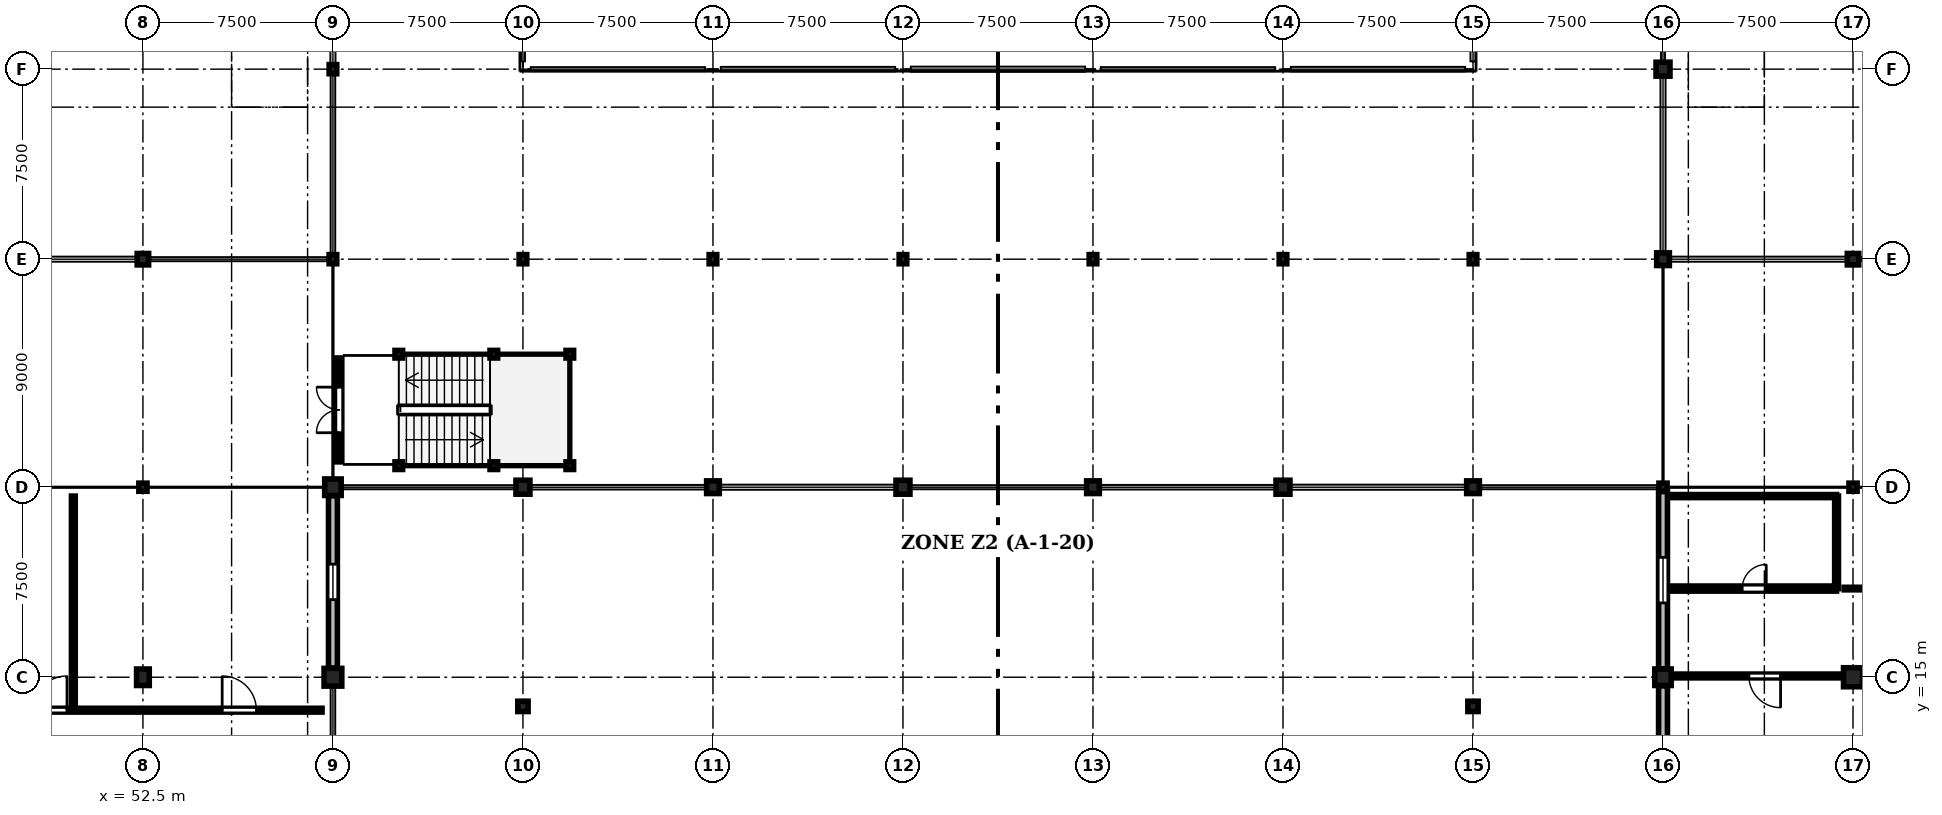
"""IFC4 building model, lengths in metres.
Left out: names, types, materials, properties, quantities, classifications, styles, units other than length and angle.
Written with IfcOpenShell. Run it as: python <this file> out.ifc"""

import sys

from ifc_helpers import new_model, si_unit, direction, frame, frame_2d, origin, origin_2d, place, context, subcontext, project, spatial, rectangle, hollow_circle, i_section, extrude, element, fill, save


model = new_model("IFC4")
c1 = context("Model", 3, precision=1e-05, world=origin(), true_north=direction((0.0, 1.0)))
c2 = subcontext(c1, "Body", "Model", "MODEL_VIEW")
j1 = project(units=[si_unit("LENGTHUNIT", "METRE"), si_unit("PLANEANGLEUNIT", "RADIAN")], contexts=[c1])
p1 = place(None, origin())
s1 = spatial("IfcSite", under=j1, at=p1, CompositionType="ELEMENT")
p2 = place(p1, origin())
s2 = spatial("IfcBuilding", under=s1, at=p2, CompositionType="ELEMENT")
p3 = place(p2, frame((0.0, 0.0, 4.8)))
s3 = spatial("IfcBuildingStorey", under=s2, at=p3, CompositionType="ELEMENT", Elevation=4.8)
p4 = place(p3, frame((52.5, 15.0, 0.0), z_axis=(0.0, 0.0, 1.0), x_axis=(1.0, 0.0, 0.0)))
e1 = element("IfcColumn", 1, at=p4, inside=s3, PredefinedType="COLUMN", context=c2, shape_type="SweptSolid", body=[
    extrude(rectangle(XDim=0.5, YDim=0.65, at=origin_2d()), origin(), (0.0, 0.0, 1.0), 4.5),
])
p5 = place(p3, frame((52.5, 22.5, 0.0), z_axis=(0.0, 0.0, 1.0), x_axis=(1.0, 0.0, 0.0)))
e2 = element("IfcColumn", 2, at=p5, inside=s3, PredefinedType="COLUMN", context=c2, shape_type="SweptSolid", body=[
    extrude(rectangle(XDim=0.32, YDim=0.32, at=origin_2d()), origin(), (0.0, 0.0, 1.0), 4.5),
])
p6 = place(p3, frame((52.5, 31.5, 0.0), z_axis=(0.0, 0.0, 1.0), x_axis=(1.0, 0.0, 0.0)))
e3 = element("IfcColumn", 3, at=p6, inside=s3, PredefinedType="COLUMN", context=c2, shape_type="SweptSolid", body=[
    extrude(rectangle(XDim=0.45, YDim=0.45, at=origin_2d()), origin(), (0.0, 0.0, 1.0), 4.5),
])
p7 = place(p3, frame((60.0, 15.0, 0.0), z_axis=(0.0, 0.0, 1.0), x_axis=(1.0, 0.0, 0.0)))
e4 = element("IfcColumn", 4, at=p7, inside=s3, PredefinedType="COLUMN", context=c2, shape_type="SweptSolid", body=[
    extrude(rectangle(XDim=0.7, YDim=0.7, at=origin_2d()), origin(), (0.0, 0.0, 1.0), 4.5),
])
p8 = place(p3, frame((60.0, 22.5, 0.0), z_axis=(0.0, 0.0, 1.0), x_axis=(1.0, 0.0, 0.0)))
e5 = element("IfcColumn", 5, at=p8, inside=s3, PredefinedType="COLUMN", context=c2, shape_type="SweptSolid", body=[
    extrude(rectangle(XDim=0.65, YDim=0.65, at=origin_2d()), origin(), (0.0, 0.0, 1.0), 4.5),
])
for number, where, z_axis, x_axis in (
    (6, (60.0, 31.5, 0.0), (0.0, 0.0, 1.0), (1.0, 0.0, 0.0)),
    (7, (60.0, 39.0, 0.0), (0.0, 0.0, 1.0), (1.0, 0.0, 0.0)),
):
    element("IfcColumn", number, at=place(p3, frame(where, z_axis=z_axis, x_axis=x_axis)), inside=s3, PredefinedType="COLUMN", context=c2, shape_type="SweptSolid", body=[
        extrude(i_section(OverallWidth=0.3, OverallDepth=0.36, WebThickness=0.012, FlangeThickness=0.022, FilletRadius=0.027, at=origin_2d()), origin(), (0.0, 0.0, 1.0), 4.5),
    ])
p9 = place(p3, frame((67.5, 22.5, 0.0), z_axis=(0.0, 0.0, 1.0), x_axis=(1.0, 0.0, 0.0)))
e8 = element("IfcColumn", 8, at=p9, inside=s3, PredefinedType="COLUMN", context=c2, shape_type="SweptSolid", body=[
    extrude(rectangle(XDim=0.55, YDim=0.55, at=origin_2d()), origin(), (0.0, 0.0, 1.0), 4.5),
])
p10 = place(p3, frame((67.5, 31.5, 0.0), z_axis=(0.0, 0.0, 1.0), x_axis=(1.0, 0.0, 0.0)))
e9 = element("IfcColumn", 9, at=p10, inside=s3, PredefinedType="COLUMN", context=c2, shape_type="SweptSolid", body=[
    extrude(i_section(OverallWidth=0.3, OverallDepth=0.36, WebThickness=0.012, FlangeThickness=0.022, FilletRadius=0.027, at=origin_2d()), origin(), (0.0, 0.0, 1.0), 4.5),
])
p11 = place(p3, frame((75.0, 22.5, 0.0), z_axis=(0.0, 0.0, 1.0), x_axis=(1.0, 0.0, 0.0)))
e10 = element("IfcColumn", 10, at=p11, inside=s3, PredefinedType="COLUMN", context=c2, shape_type="SweptSolid", body=[
    extrude(rectangle(XDim=0.5, YDim=0.5, at=origin_2d()), origin(), (0.0, 0.0, 1.0), 4.5),
])
p12 = place(p3, frame((75.0, 31.5, 0.0), z_axis=(0.0, 0.0, 1.0), x_axis=(1.0, 0.0, 0.0)))
e11 = element("IfcColumn", 11, at=p12, inside=s3, PredefinedType="COLUMN", context=c2, shape_type="SweptSolid", body=[
    extrude(i_section(OverallWidth=0.3, OverallDepth=0.36, WebThickness=0.012, FlangeThickness=0.022, FilletRadius=0.027, at=origin_2d()), origin(), (0.0, 0.0, 1.0), 4.5),
])
p13 = place(p3, frame((82.5, 22.5, 0.0), z_axis=(0.0, 0.0, 1.0), x_axis=(1.0, 0.0, 0.0)))
e12 = element("IfcColumn", 12, at=p13, inside=s3, PredefinedType="COLUMN", context=c2, shape_type="SweptSolid", body=[
    extrude(rectangle(XDim=0.55, YDim=0.55, at=origin_2d()), origin(), (0.0, 0.0, 1.0), 4.5),
])
p14 = place(p3, frame((82.5, 31.5, 0.0), z_axis=(0.0, 0.0, 1.0), x_axis=(1.0, 0.0, 0.0)))
e13 = element("IfcColumn", 13, at=p14, inside=s3, PredefinedType="COLUMN", context=c2, shape_type="SweptSolid", body=[
    extrude(i_section(OverallWidth=0.3, OverallDepth=0.36, WebThickness=0.012, FlangeThickness=0.022, FilletRadius=0.027, at=origin_2d()), origin(), (0.0, 0.0, 1.0), 4.5),
])
p15 = place(p3, frame((90.0, 22.5, 0.0), z_axis=(0.0, 0.0, 1.0), x_axis=(1.0, 0.0, 0.0)))
e14 = element("IfcColumn", 14, at=p15, inside=s3, PredefinedType="COLUMN", context=c2, shape_type="SweptSolid", body=[
    extrude(rectangle(XDim=0.5, YDim=0.5, at=origin_2d()), origin(), (0.0, 0.0, 1.0), 4.5),
])
p16 = place(p3, frame((90.0, 31.5, 0.0), z_axis=(0.0, 0.0, 1.0), x_axis=(1.0, 0.0, 0.0)))
e15 = element("IfcColumn", 15, at=p16, inside=s3, PredefinedType="COLUMN", context=c2, shape_type="SweptSolid", body=[
    extrude(i_section(OverallWidth=0.3, OverallDepth=0.36, WebThickness=0.012, FlangeThickness=0.022, FilletRadius=0.027, at=origin_2d()), origin(), (0.0, 0.0, 1.0), 4.5),
])
p17 = place(p3, frame((97.5, 22.5, 0.0), z_axis=(0.0, 0.0, 1.0), x_axis=(1.0, 0.0, 0.0)))
e16 = element("IfcColumn", 16, at=p17, inside=s3, PredefinedType="COLUMN", context=c2, shape_type="SweptSolid", body=[
    extrude(rectangle(XDim=0.55, YDim=0.55, at=origin_2d()), origin(), (0.0, 0.0, 1.0), 4.5),
])
p18 = place(p3, frame((97.5, 31.5, 0.0), z_axis=(0.0, 0.0, 1.0), x_axis=(1.0, 0.0, 0.0)))
e17 = element("IfcColumn", 17, at=p18, inside=s3, PredefinedType="COLUMN", context=c2, shape_type="SweptSolid", body=[
    extrude(i_section(OverallWidth=0.3, OverallDepth=0.36, WebThickness=0.012, FlangeThickness=0.022, FilletRadius=0.027, at=origin_2d()), origin(), (0.0, 0.0, 1.0), 4.5),
])
p19 = place(p3, frame((105.0, 22.5, 0.0), z_axis=(0.0, 0.0, 1.0), x_axis=(1.0, 0.0, 0.0)))
e18 = element("IfcColumn", 18, at=p19, inside=s3, PredefinedType="COLUMN", context=c2, shape_type="SweptSolid", body=[
    extrude(rectangle(XDim=0.5, YDim=0.5, at=origin_2d()), origin(), (0.0, 0.0, 1.0), 4.5),
])
p20 = place(p3, frame((105.0, 31.5, 0.0), z_axis=(0.0, 0.0, 1.0), x_axis=(1.0, 0.0, 0.0)))
e19 = element("IfcColumn", 19, at=p20, inside=s3, PredefinedType="COLUMN", context=c2, shape_type="SweptSolid", body=[
    extrude(i_section(OverallWidth=0.3, OverallDepth=0.36, WebThickness=0.012, FlangeThickness=0.022, FilletRadius=0.027, at=origin_2d()), origin(), (0.0, 0.0, 1.0), 4.5),
])
p21 = place(p3, frame((112.5, 15.0, 0.0), z_axis=(0.0, 0.0, 1.0), x_axis=(1.0, 0.0, 0.0)))
e20 = element("IfcColumn", 20, at=p21, inside=s3, PredefinedType="COLUMN", context=c2, shape_type="SweptSolid", body=[
    extrude(rectangle(XDim=0.65, YDim=0.65, at=origin_2d()), origin(), (0.0, 0.0, 1.0), 4.5),
])
p22 = place(p3, frame((112.5, 22.5, 0.0), z_axis=(0.0, 0.0, 1.0), x_axis=(1.0, 0.0, 0.0)))
e21 = element("IfcColumn", 21, at=p22, inside=s3, PredefinedType="COLUMN", context=c2, shape_type="SweptSolid", body=[
    extrude(rectangle(XDim=0.32, YDim=0.32, at=origin_2d()), origin(), (0.0, 0.0, 1.0), 4.5),
])
p23 = place(p3, frame((112.5, 31.5, 0.0), z_axis=(0.0, 0.0, 1.0), x_axis=(1.0, 0.0, 0.0)))
e22 = element("IfcColumn", 22, at=p23, inside=s3, PredefinedType="COLUMN", context=c2, shape_type="SweptSolid", body=[
    extrude(rectangle(XDim=0.5, YDim=0.5, at=origin_2d()), origin(), (0.0, 0.0, 1.0), 4.5),
])
p24 = place(p3, frame((112.5, 39.0, 0.0), z_axis=(0.0, 0.0, 1.0), x_axis=(1.0, 0.0, 0.0)))
e23 = element("IfcColumn", 23, at=p24, inside=s3, PredefinedType="COLUMN", context=c2, shape_type="SweptSolid", body=[
    extrude(rectangle(XDim=0.55, YDim=0.55, at=origin_2d()), origin(), (0.0, 0.0, 1.0), 4.5),
])
p25 = place(p3, frame((120.0, 15.0, 0.0), z_axis=(0.0, 0.0, 1.0), x_axis=(1.0, 0.0, 0.0)))
e24 = element("IfcColumn", 24, at=p25, inside=s3, PredefinedType="COLUMN", context=c2, shape_type="SweptSolid", body=[
    extrude(rectangle(XDim=0.75, YDim=0.75, at=origin_2d()), origin(), (0.0, 0.0, 1.0), 4.5),
])
p26 = place(p3, frame((120.0, 22.5, 0.0), z_axis=(0.0, 0.0, 1.0), x_axis=(1.0, 0.0, 0.0)))
e25 = element("IfcColumn", 25, at=p26, inside=s3, PredefinedType="COLUMN", context=c2, shape_type="SweptSolid", body=[
    extrude(rectangle(XDim=0.32, YDim=0.32, at=origin_2d()), origin(), (0.0, 0.0, 1.0), 4.5),
])
p27 = place(p3, frame((120.0, 31.5, 0.0), z_axis=(0.0, 0.0, 1.0), x_axis=(1.0, 0.0, 0.0)))
e26 = element("IfcColumn", 26, at=p27, inside=s3, PredefinedType="COLUMN", context=c2, shape_type="SweptSolid", body=[
    extrude(rectangle(XDim=0.45, YDim=0.45, at=origin_2d()), origin(), (0.0, 0.0, 1.0), 4.5),
])
for number, where, z_axis, x_axis in (
    (27, (62.6, 23.35, 0.0), (0.0, 0.0, 1.0), (1.0, 0.0, 0.0)),
    (28, (66.35, 23.35, 0.0), (0.0, 0.0, 1.0), (1.0, 0.0, 0.0)),
    (29, (69.35, 23.35, 0.0), (0.0, 0.0, 1.0), (1.0, 0.0, 0.0)),
    (30, (62.6, 27.75, 0.0), (0.0, 0.0, 1.0), (1.0, 0.0, 0.0)),
    (31, (66.35, 27.75, 0.0), (0.0, 0.0, 1.0), (1.0, 0.0, 0.0)),
    (32, (69.35, 27.75, 0.0), (0.0, 0.0, 1.0), (1.0, 0.0, 0.0)),
):
    element("IfcColumn", number, at=place(p3, frame(where, z_axis=z_axis, x_axis=x_axis)), inside=s3, PredefinedType="COLUMN", context=c2, shape_type="SweptSolid", body=[
        extrude(i_section(OverallWidth=0.3, OverallDepth=0.3, WebThickness=0.011, FlangeThickness=0.019, FilletRadius=0.027, at=origin_2d()), origin(), (0.0, 0.0, 1.0), 4.5),
    ])
for number, where, z_axis, x_axis in (
    (33, (67.5, 13.85, 0.0), (0.0, 0.0, 1.0), (1.0, 0.0, 0.0)),
    (34, (105.0, 13.85, 0.0), (0.0, 0.0, 1.0), (1.0, 0.0, 0.0)),
):
    element("IfcColumn", number, at=place(p3, frame(where, z_axis=z_axis, x_axis=x_axis)), inside=s3, PredefinedType="COLUMN", context=c2, shape_type="SweptSolid", body=[
        extrude(hollow_circle(Radius=0.203, WallThickness=0.016, at=origin_2d()), origin(), (0.0, 0.0, 1.0), 3.58),
    ])
p28 = place(p3, frame((60.0, 22.165, 0.0), z_axis=(0.0, 0.0, 1.0), x_axis=(0.0, -1.0, 0.0)))
e35 = element("IfcWall", 35, at=p28, inside=s3, PredefinedType="STANDARD", context=c2, shape_type="SweptSolid", body=[
    extrude(rectangle(XDim=6.805, YDim=0.35, at=frame_2d((3.402, 0.0))), origin(), (0.0, 0.0, 1.0), 3.63),
])
p29 = place(p28, frame((2.702, 0.0, 0.9)))
e36 = element("IfcOpeningElement", 36, at=p29, cuts=e35, PredefinedType="OPENING", context=c2, shape_type="SweptSolid", body=[
    extrude(rectangle(XDim=1.4, YDim=1.8, at=frame_2d((0.7, 0.9))), frame((0.0, 0.185, 0.0), z_axis=(0.0, -1.0, 0.0), x_axis=(1.0, 0.0, 0.0)), (0.0, 0.0, 1.0), 0.37),
])
p30 = place(p3, frame((112.5, 7.86, 0.0), z_axis=(0.0, 0.0, 1.0), x_axis=(0.0, 1.0, 0.0)))
e37 = element("IfcWall", 37, at=p30, inside=s3, PredefinedType="STANDARD", context=c2, shape_type="SweptSolid", body=[
    extrude(rectangle(XDim=6.805, YDim=0.35, at=frame_2d((3.402, 0.0))), origin(), (0.0, 0.0, 1.0), 3.63),
])
p31 = place(p30, frame((2.202, 0.0, 0.9)))
e38 = element("IfcOpeningElement", 38, at=p31, cuts=e37, PredefinedType="OPENING", context=c2, shape_type="SweptSolid", body=[
    extrude(rectangle(XDim=2.4, YDim=2.45, at=frame_2d((1.2, 1.225))), frame((0.0, 0.185, 0.0), z_axis=(0.0, -1.0, 0.0), x_axis=(1.0, 0.0, 0.0)), (0.0, 0.0, 1.0), 0.37),
])
p32 = place(p3, frame((112.5, 15.335, 0.0), z_axis=(0.0, 0.0, 1.0), x_axis=(0.0, 1.0, 0.0)))
e39 = element("IfcWall", 39, at=p32, inside=s3, PredefinedType="STANDARD", context=c2, shape_type="SweptSolid", body=[
    extrude(rectangle(XDim=6.995, YDim=0.35, at=frame_2d((3.498, 0.0))), origin(), (0.0, 0.0, 1.0), 3.63),
])
p33 = place(p32, frame((2.597, 0.0, 0.9)))
e40 = element("IfcOpeningElement", 40, at=p33, cuts=e39, PredefinedType="OPENING", context=c2, shape_type="SweptSolid", body=[
    extrude(rectangle(XDim=1.8, YDim=2.1, at=frame_2d((0.9, 1.05))), frame((0.0, 0.185, 0.0), z_axis=(0.0, -1.0, 0.0), x_axis=(1.0, 0.0, 0.0)), (0.0, 0.0, 1.0), 0.37),
])
p34 = place(p3, frame((60.25, 23.5, 0.0), z_axis=(0.0, 0.0, 1.0), x_axis=(0.0, 1.0, 0.0)))
e41 = element("IfcWall", 41, at=p34, inside=s3, PredefinedType="STANDARD", context=c2, shape_type="SweptSolid", body=[
    extrude(rectangle(XDim=4.1, YDim=0.2, at=frame_2d((2.05, 0.0))), origin(), (0.0, 0.0, 1.0), 3.465),
])
p35 = place(p34, frame((1.15, 0.0, 0.0)))
e42 = element("IfcOpeningElement", 42, at=p35, cuts=e41, PredefinedType="OPENING", context=c2, shape_type="SweptSolid", body=[
    extrude(rectangle(XDim=1.8, YDim=2.25, at=frame_2d((0.9, 1.125))), frame((0.0, 0.11, 0.0), z_axis=(0.0, -1.0, 0.0), x_axis=(1.0, 0.0, 0.0)), (0.0, 0.0, 1.0), 0.22),
])
p36 = place(p3, frame((40.097, 13.7, 0.0), z_axis=(0.0, 0.0, 1.0), x_axis=(1.0, 0.0, 0.0)))
e43 = element("IfcWall", 43, at=p36, inside=s3, PredefinedType="PARTITIONING", context=c2, shape_type="SweptSolid", body=[
    extrude(rectangle(XDim=9.657, YDim=0.15, at=frame_2d((4.828, 0.0))), origin(), (0.0, 0.0, 1.0), 4.165),
])
p37 = place(p36, frame((8.057, 0.0, 0.0)))
e44 = element("IfcOpeningElement", 44, at=p37, cuts=e43, PredefinedType="OPENING", context=c2, shape_type="SweptSolid", body=[
    extrude(rectangle(XDim=1.35, YDim=2.25, at=frame_2d((0.675, 1.125))), frame((0.0, 0.085, 0.0), z_axis=(0.0, -1.0, 0.0), x_axis=(1.0, 0.0, 0.0)), (0.0, 0.0, 1.0), 0.17),
])
p38 = place(p3, frame((49.913, 13.7, 0.0), z_axis=(0.0, 0.0, 1.0), x_axis=(1.0, 0.0, 0.0)))
e45 = element("IfcWall", 45, at=p38, inside=s3, PredefinedType="PARTITIONING", context=c2, shape_type="SweptSolid", body=[
    extrude(rectangle(XDim=9.657, YDim=0.15, at=frame_2d((4.828, 0.0))), origin(), (0.0, 0.0, 1.0), 4.165),
])
p39 = place(p38, frame((5.715, 0.0, 0.0)))
e46 = element("IfcOpeningElement", 46, at=p39, cuts=e45, PredefinedType="OPENING", context=c2, shape_type="SweptSolid", body=[
    extrude(rectangle(XDim=1.35, YDim=2.25, at=frame_2d((0.675, 1.125))), frame((0.0, 0.085, 0.0), z_axis=(0.0, -1.0, 0.0), x_axis=(1.0, 0.0, 0.0)), (0.0, 0.0, 1.0), 0.17),
])
p40 = place(p3, frame((123.9, 15.05, 0.0), z_axis=(0.0, 0.0, 1.0), x_axis=(-1.0, 0.0, 0.0)))
e47 = element("IfcWall", 47, at=p40, inside=s3, PredefinedType="PARTITIONING", context=c2, shape_type="SweptSolid", body=[
    extrude(rectangle(XDim=11.05, YDim=0.15, at=frame_2d((5.525, 0.0))), origin(), (0.0, 0.0, 1.0), 3.515),
])
p41 = place(p40, frame((6.76, 0.0, 0.0)))
e48 = element("IfcOpeningElement", 48, at=p41, cuts=e47, PredefinedType="OPENING", context=c2, shape_type="SweptSolid", body=[
    extrude(rectangle(XDim=1.25, YDim=2.2, at=frame_2d((0.625, 1.1))), frame((0.0, 0.085, 0.0), z_axis=(0.0, -1.0, 0.0), x_axis=(1.0, 0.0, 0.0)), (0.0, 0.0, 1.0), 0.17),
])
p42 = place(p3, frame((112.85, 18.5, 0.0), z_axis=(0.0, 0.0, 1.0), x_axis=(1.0, 0.0, 0.0)))
e49 = element("IfcWall", 49, at=p42, inside=s3, PredefinedType="STANDARD", context=c2, shape_type="SweptSolid", body=[
    extrude(rectangle(XDim=6.5, YDim=0.2, at=frame_2d((3.25, 0.0))), origin(), (0.0, 0.0, 1.0), 4.165),
])
p43 = place(p42, frame((2.775, 0.0, 0.0)))
e50 = element("IfcOpeningElement", 50, at=p43, cuts=e49, PredefinedType="OPENING", context=c2, shape_type="SweptSolid", body=[
    extrude(rectangle(XDim=0.95, YDim=2.15, at=frame_2d((0.475, 1.075))), frame((0.0, 0.11, 0.0), z_axis=(0.0, -1.0, 0.0), x_axis=(1.0, 0.0, 0.0)), (0.0, 0.0, 1.0), 0.22),
])
p44 = place(p3, frame((119.65, 18.5, 0.0), z_axis=(0.0, 0.0, 1.0), x_axis=(1.0, 0.0, 0.0)))
e51 = element("IfcWall", 51, at=p44, inside=s3, PredefinedType="PARTITIONING", context=c2, shape_type="SweptSolid", body=[
    extrude(rectangle(XDim=52.5, YDim=0.1, at=frame_2d((26.25, 0.0))), origin(), (0.0, 0.0, 1.0), 4.165),
])
p45 = place(p44, frame((40.85, 0.0, 0.0)))
e52 = element("IfcOpeningElement", 52, at=p45, cuts=e51, PredefinedType="OPENING", context=c2, shape_type="SweptSolid", body=[
    extrude(rectangle(XDim=1.25, YDim=2.2, at=frame_2d((0.625, 1.1))), frame((0.0, 0.06, 0.0), z_axis=(0.0, -1.0, 0.0), x_axis=(1.0, 0.0, 0.0)), (0.0, 0.0, 1.0), 0.12),
])
p46 = place(p3, frame((49.753, 13.7, 0.0), z_axis=(0.0, 0.0, 1.0), x_axis=(0.0, 1.0, 0.0)))
e53 = element("IfcWall", 53, at=p46, inside=s3, PredefinedType="PARTITIONING", context=c2, shape_type="SweptSolid", body=[
    extrude(rectangle(XDim=8.45, YDim=0.15, at=frame_2d((4.225, 0.0))), origin(), (0.0, 0.0, 1.0), 4.165),
])
p47 = place(p3, frame((119.35, 18.5, 0.0), z_axis=(0.0, 0.0, 1.0), x_axis=(0.0, 1.0, 0.0)))
e54 = element("IfcWall", 54, at=p47, inside=s3, PredefinedType="PARTITIONING", context=c2, shape_type="SweptSolid", body=[
    extrude(rectangle(XDim=3.65, YDim=0.15, at=frame_2d((1.825, 0.0))), origin(), (0.0, 0.0, 1.0), 4.165),
])
p48 = place(p3, frame((112.85, 22.15, 0.0), z_axis=(0.0, 0.0, 1.0), x_axis=(1.0, 0.0, 0.0)))
e55 = element("IfcWall", 55, at=p48, inside=s3, PredefinedType="PARTITIONING", context=c2, shape_type="SweptSolid", body=[
    extrude(rectangle(XDim=6.5, YDim=0.12, at=frame_2d((3.25, 0.0))), origin(), (0.0, 0.0, 1.0), 3.565),
])
p49 = place(p29, origin())
e56 = element("IfcWindow", 56, at=p49, inside=s3, PartitioningType="SINGLE_PANEL", PredefinedType="WINDOW", context=c2, shape_type="SweptSolid", body=[
    extrude(rectangle(XDim=1.4, YDim=1.8, at=frame_2d((0.7, 0.9))), frame((0.0, 0.03, 0.0), z_axis=(0.0, -1.0, 0.0), x_axis=(1.0, 0.0, 0.0)), (0.0, 0.0, 1.0), 0.06),
])
fill(e36, e56)
p50 = place(p33, origin())
e57 = element("IfcWindow", 57, at=p50, inside=s3, PartitioningType="SINGLE_PANEL", PredefinedType="WINDOW", context=c2, shape_type="SweptSolid", body=[
    extrude(rectangle(XDim=1.8, YDim=2.1, at=frame_2d((0.9, 1.05))), frame((0.0, 0.03, 0.0), z_axis=(0.0, -1.0, 0.0), x_axis=(1.0, 0.0, 0.0)), (0.0, 0.0, 1.0), 0.06),
])
fill(e40, e57)
p51 = place(p35, origin())
e58 = element("IfcDoor", 58, at=p51, inside=s3, OperationType="DOUBLE_DOOR_SINGLE_SWING", PredefinedType="DOOR", context=c2, shape_type="SweptSolid", body=[
    extrude(rectangle(XDim=1.8, YDim=2.25, at=frame_2d((0.9, 1.125))), frame((0.0, 0.025, 0.0), z_axis=(0.0, -1.0, 0.0), x_axis=(1.0, 0.0, 0.0)), (0.0, 0.0, 1.0), 0.05),
])
fill(e42, e58)
p52 = place(p37, origin())
e59 = element("IfcDoor", 59, at=p52, inside=s3, OperationType="SINGLE_SWING_RIGHT", PredefinedType="DOOR", context=c2, shape_type="SweptSolid", body=[
    extrude(rectangle(XDim=1.35, YDim=2.25, at=frame_2d((0.675, 1.125))), frame((0.0, 0.025, 0.0), z_axis=(0.0, -1.0, 0.0), x_axis=(1.0, 0.0, 0.0)), (0.0, 0.0, 1.0), 0.05),
])
fill(e44, e59)
p53 = place(p39, origin())
e60 = element("IfcDoor", 60, at=p53, inside=s3, OperationType="SINGLE_SWING_LEFT", PredefinedType="DOOR", context=c2, shape_type="SweptSolid", body=[
    extrude(rectangle(XDim=1.35, YDim=2.25, at=frame_2d((0.675, 1.125))), frame((0.0, 0.025, 0.0), z_axis=(0.0, -1.0, 0.0), x_axis=(1.0, 0.0, 0.0)), (0.0, 0.0, 1.0), 0.05),
])
fill(e46, e60)
p54 = place(p41, origin())
e61 = element("IfcDoor", 61, at=p54, inside=s3, OperationType="SINGLE_SWING_LEFT", PredefinedType="DOOR", context=c2, shape_type="SweptSolid", body=[
    extrude(rectangle(XDim=1.25, YDim=2.2, at=frame_2d((0.625, 1.1))), frame((0.0, 0.025, 0.0), z_axis=(0.0, -1.0, 0.0), x_axis=(1.0, 0.0, 0.0)), (0.0, 0.0, 1.0), 0.05),
])
fill(e48, e61)
p55 = place(p43, origin())
e62 = element("IfcDoor", 62, at=p55, inside=s3, OperationType="SINGLE_SWING_RIGHT", PredefinedType="DOOR", context=c2, shape_type="SweptSolid", body=[
    extrude(rectangle(XDim=0.95, YDim=2.15, at=frame_2d((0.475, 1.075))), frame((0.0, 0.025, 0.0), z_axis=(0.0, -1.0, 0.0), x_axis=(1.0, 0.0, 0.0)), (0.0, 0.0, 1.0), 0.05),
])
fill(e50, e62)
save(model, sys.argv[1])
